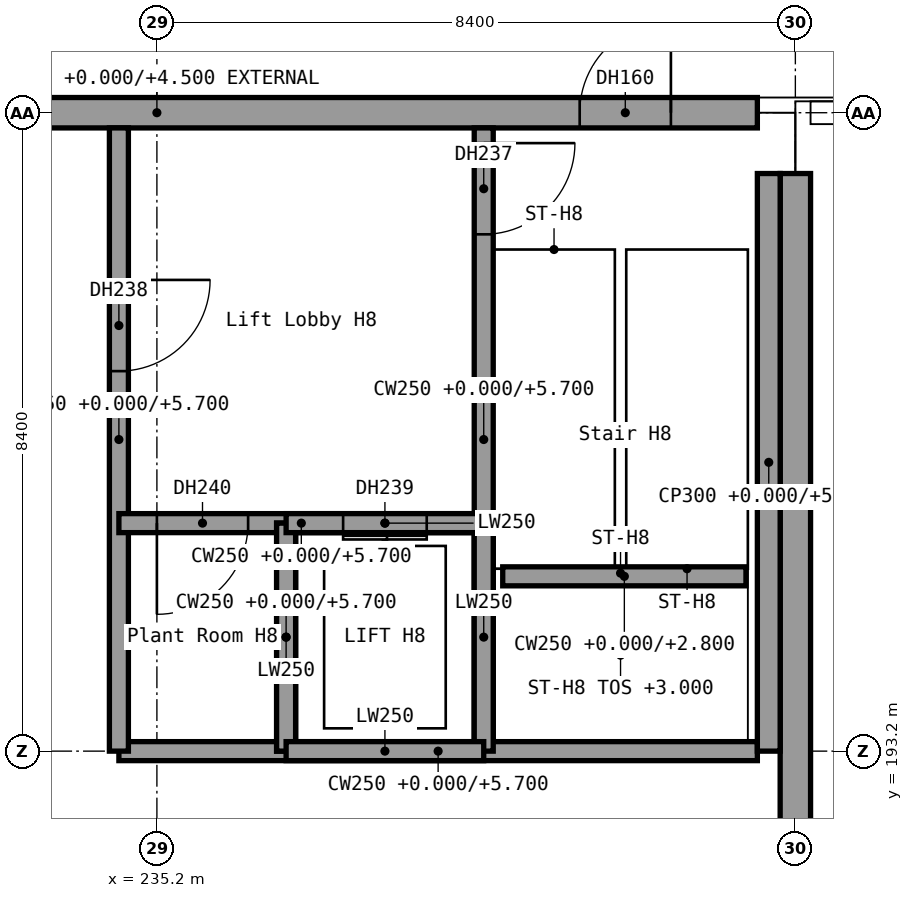
"""IFC4 building model, lengths in metres.
Left out: names, types, materials, properties, quantities, classifications, styles, units other than length and angle.
Written with IfcOpenShell. Run it as: python <this file> out.ifc"""

import sys

from ifc_helpers import new_model, si_unit, direction, frame, frame_2d, origin, origin_2d, place, context, subcontext, project, spatial, rectangle, extrude, element, fill, save


model = new_model("IFC4")
c1 = context("Model", 3, precision=1e-05, world=origin(), true_north=direction((0.0, 1.0)))
c2 = subcontext(c1, "Body", "Model", "MODEL_VIEW")
j1 = project(units=[si_unit("LENGTHUNIT", "METRE"), si_unit("PLANEANGLEUNIT", "RADIAN")], contexts=[c1])
p1 = place(None, origin())
s1 = spatial("IfcSite", under=j1, at=p1, CompositionType="ELEMENT")
p2 = place(p1, origin())
s2 = spatial("IfcBuilding", under=s1, at=p2, CompositionType="ELEMENT")
p3 = place(p2, origin())
s3 = spatial("IfcBuildingStorey", under=s2, at=p3, CompositionType="ELEMENT", Elevation=0.0)
p4 = place(p3, frame((243.6, 201.6, 0.0), z_axis=(0.0, 0.0, 1.0), x_axis=(1.0, 0.0, 0.0)))
e1 = element("IfcColumn", 1, at=p4, inside=s3, PredefinedType="COLUMN", context=c2, shape_type="SweptSolid", body=[
    extrude(rectangle(XDim=1.0, YDim=1.6, at=origin_2d()), origin(), (0.0, 0.0, 1.0), 6.0),
])
p5 = place(p3, frame((227.3, 201.6, 0.0), z_axis=(0.0, 0.0, 1.0), x_axis=(1.0, 0.0, 0.0)))
e2 = element("IfcWall", 2, at=p5, inside=s3, PredefinedType="STANDARD", context=c2, shape_type="SweptSolid", body=[
    extrude(rectangle(XDim=15.8, YDim=0.4, at=frame_2d((7.9, 0.0))), origin(), (0.0, 0.0, 1.0), 4.5),
])
p6 = place(p5, frame((13.462, 0.0, 0.0)))
e3 = element("IfcOpeningElement", 3, at=p6, cuts=e2, PredefinedType="OPENING", context=c2, shape_type="SweptSolid", body=[
    extrude(rectangle(XDim=1.2, YDim=2.1, at=frame_2d((0.6, 1.05))), frame((0.0, 0.2, 0.0), z_axis=(0.0, -1.0, 0.0), x_axis=(1.0, 0.0, 0.0)), (0.0, 0.0, 1.0), 0.4),
])
p7 = place(p5, frame((1.4, 0.0, 0.0)))
e4 = element("IfcOpeningElement", 4, at=p7, cuts=e2, PredefinedType="OPENING", context=c2, shape_type="SweptSolid", body=[
    extrude(rectangle(XDim=3.0, YDim=2.4, at=frame_2d((1.5, 1.2))), frame((0.0, 0.2, 0.0), z_axis=(0.0, -1.0, 0.0), x_axis=(1.0, 0.0, 0.0)), (0.0, 0.0, 1.0), 0.4),
])
p8 = place(p3, frame((243.6, 101.6, 0.0), z_axis=(0.0, 0.0, 1.0), x_axis=(0.0, 1.0, 0.0)))
e5 = element("IfcWall", 5, at=p8, inside=s3, PredefinedType="SHEAR", context=c2, shape_type="SweptSolid", body=[
    extrude(rectangle(XDim=99.2, YDim=0.4, at=frame_2d((49.6, 0.0))), origin(), (0.0, 0.0, 1.0), 6.0),
])
p9 = place(p8, frame((10.9, 0.0, 0.0)))
e6 = element("IfcOpeningElement", 6, at=p9, cuts=e5, PredefinedType="OPENING", context=c2, shape_type="SweptSolid", body=[
    extrude(rectangle(XDim=1.8, YDim=2.4, at=frame_2d((0.9, 1.2))), frame((0.0, 0.2, 0.0), z_axis=(0.0, -1.0, 0.0), x_axis=(1.0, 0.0, 0.0)), (0.0, 0.0, 1.0), 0.4),
])
p10 = place(p8, frame((27.7, 0.0, 0.0)))
e7 = element("IfcOpeningElement", 7, at=p10, cuts=e5, PredefinedType="OPENING", context=c2, shape_type="SweptSolid", body=[
    extrude(rectangle(XDim=1.8, YDim=2.4, at=frame_2d((0.9, 1.2))), frame((0.0, 0.2, 0.0), z_axis=(0.0, -1.0, 0.0), x_axis=(1.0, 0.0, 0.0)), (0.0, 0.0, 1.0), 0.4),
])
p11 = place(p8, frame((44.5, 0.0, 0.0)))
e8 = element("IfcOpeningElement", 8, at=p11, cuts=e5, PredefinedType="OPENING", context=c2, shape_type="SweptSolid", body=[
    extrude(rectangle(XDim=1.8, YDim=2.4, at=frame_2d((0.9, 1.2))), frame((0.0, 0.2, 0.0), z_axis=(0.0, -1.0, 0.0), x_axis=(1.0, 0.0, 0.0)), (0.0, 0.0, 1.0), 0.4),
])
p12 = place(p8, frame((61.3, 0.0, 0.0)))
e9 = element("IfcOpeningElement", 9, at=p12, cuts=e5, PredefinedType="OPENING", context=c2, shape_type="SweptSolid", body=[
    extrude(rectangle(XDim=1.8, YDim=2.4, at=frame_2d((0.9, 1.2))), frame((0.0, 0.2, 0.0), z_axis=(0.0, -1.0, 0.0), x_axis=(1.0, 0.0, 0.0)), (0.0, 0.0, 1.0), 0.4),
])
p13 = place(p8, frame((78.1, 0.0, 0.0)))
e10 = element("IfcOpeningElement", 10, at=p13, cuts=e5, PredefinedType="OPENING", context=c2, shape_type="SweptSolid", body=[
    extrude(rectangle(XDim=1.8, YDim=2.4, at=frame_2d((0.9, 1.2))), frame((0.0, 0.2, 0.0), z_axis=(0.0, -1.0, 0.0), x_axis=(1.0, 0.0, 0.0)), (0.0, 0.0, 1.0), 0.4),
])
p14 = place(p3, frame((243.8, 201.6, 6.0), z_axis=(0.0, 0.0, 1.0), x_axis=(1.0, 0.0, 0.0)))
e11 = element("IfcWall", 11, at=p14, inside=s3, PredefinedType="PARAPET", context=c2, shape_type="SweptSolid", body=[
    extrude(rectangle(XDim=16.45, YDim=0.3, at=frame_2d((8.225, 0.0))), origin(), (0.0, 0.0, 1.0), 1.2),
])
p15 = place(p3, frame((239.5, 201.4, 0.0), z_axis=(0.0, 0.0, 1.0), x_axis=(0.0, -1.0, 0.0)))
e12 = element("IfcWall", 12, at=p15, inside=s3, PredefinedType="SHEAR", context=c2, shape_type="SweptSolid", body=[
    extrude(rectangle(XDim=8.2, YDim=0.25, at=frame_2d((4.1, 0.0))), origin(), (0.0, 0.0, 1.0), 5.7),
])
p16 = place(p15, frame((0.2, 0.0, 0.0)))
e13 = element("IfcOpeningElement", 13, at=p16, cuts=e12, PredefinedType="OPENING", context=c2, shape_type="SweptSolid", body=[
    extrude(rectangle(XDim=1.2, YDim=2.1, at=frame_2d((0.6, 1.05))), frame((0.0, 0.125, 0.0), z_axis=(0.0, -1.0, 0.0), x_axis=(1.0, 0.0, 0.0)), (0.0, 0.0, 1.0), 0.25),
])
p17 = place(p3, frame((243.1, 193.2, 0.0), z_axis=(0.0, 0.0, 1.0), x_axis=(-1.0, 0.0, 0.0)))
e14 = element("IfcWall", 14, at=p17, inside=s3, PredefinedType="SHEAR", context=c2, shape_type="SweptSolid", body=[
    extrude(rectangle(XDim=8.4, YDim=0.25, at=frame_2d((4.2, 0.0))), origin(), (0.0, 0.0, 1.0), 5.7),
])
p18 = place(p3, frame((234.7, 201.4, 0.0), z_axis=(0.0, 0.0, 1.0), x_axis=(0.0, -1.0, 0.0)))
e15 = element("IfcWall", 15, at=p18, inside=s3, PredefinedType="SHEAR", context=c2, shape_type="SweptSolid", body=[
    extrude(rectangle(XDim=8.2, YDim=0.25, at=frame_2d((4.1, 0.0))), origin(), (0.0, 0.0, 1.0), 5.7),
])
p19 = place(p18, frame((2.0, 0.0, 0.0)))
e16 = element("IfcOpeningElement", 16, at=p19, cuts=e15, PredefinedType="OPENING", context=c2, shape_type="SweptSolid", body=[
    extrude(rectangle(XDim=1.2, YDim=2.1, at=frame_2d((0.6, 1.05))), frame((0.0, 0.125, 0.0), z_axis=(0.0, -1.0, 0.0), x_axis=(1.0, 0.0, 0.0)), (0.0, 0.0, 1.0), 0.25),
])
p20 = place(p3, frame((239.5, 196.2, 0.0), z_axis=(0.0, 0.0, 1.0), x_axis=(-1.0, 0.0, 0.0)))
e17 = element("IfcWall", 17, at=p20, inside=s3, PredefinedType="SHEAR", context=c2, shape_type="SweptSolid", body=[
    extrude(rectangle(XDim=4.8, YDim=0.25, at=frame_2d((2.4, 0.0))), origin(), (0.0, 0.0, 1.0), 5.7),
])
p21 = place(p20, frame((0.75, 0.0, 0.0)))
e18 = element("IfcOpeningElement", 18, at=p21, cuts=e17, PredefinedType="OPENING", context=c2, shape_type="SweptSolid", body=[
    extrude(rectangle(XDim=1.1, YDim=2.1, at=frame_2d((0.55, 1.05))), frame((0.0, 0.125, 0.0), z_axis=(0.0, -1.0, 0.0), x_axis=(1.0, 0.0, 0.0)), (0.0, 0.0, 1.0), 0.25),
])
p22 = place(p20, frame((3.1, 0.0, 0.0)))
e19 = element("IfcOpeningElement", 19, at=p22, cuts=e17, PredefinedType="OPENING", context=c2, shape_type="SweptSolid", body=[
    extrude(rectangle(XDim=1.2, YDim=2.1, at=frame_2d((0.6, 1.05))), frame((0.0, 0.125, 0.0), z_axis=(0.0, -1.0, 0.0), x_axis=(1.0, 0.0, 0.0)), (0.0, 0.0, 1.0), 0.25),
])
p23 = place(p3, frame((236.9, 196.2, 0.0), z_axis=(0.0, 0.0, 1.0), x_axis=(0.0, -1.0, 0.0)))
e20 = element("IfcWall", 20, at=p23, inside=s3, PredefinedType="SHEAR", context=c2, shape_type="SweptSolid", body=[
    extrude(rectangle(XDim=3.0, YDim=0.25, at=frame_2d((1.5, 0.0))), origin(), (0.0, 0.0, 1.0), 5.7),
])
p24 = place(p3, frame((243.25, 200.8, 0.0), z_axis=(0.0, 0.0, 1.0), x_axis=(0.0, -1.0, 0.0)))
e21 = element("IfcWall", 21, at=p24, inside=s3, PredefinedType="SHEAR", context=c2, shape_type="SweptSolid", body=[
    extrude(rectangle(XDim=7.6, YDim=0.3, at=frame_2d((3.8, 0.0))), origin(), (0.0, 0.0, 1.0), 5.7),
])
p25 = place(p3, frame((242.95, 195.5, 0.0), z_axis=(0.0, 0.0, 1.0), x_axis=(-1.0, 0.0, 0.0)))
e22 = element("IfcWall", 22, at=p25, inside=s3, PredefinedType="SHEAR", context=c2, shape_type="SweptSolid", body=[
    extrude(rectangle(XDim=3.2, YDim=0.25, at=frame_2d((1.6, 0.0))), origin(), (0.0, 0.0, 1.0), 2.8),
])
for number, where, z_axis, x_axis in (
    (23, (239.5, 196.2, -1.4), (0.0, 0.0, 1.0), (0.0, -1.0, 0.0)),
    (24, (236.9, 196.2, -1.4), (0.0, 0.0, 1.0), (0.0, -1.0, 0.0)),
):
    element("IfcWall", number, at=place(p3, frame(where, z_axis=z_axis, x_axis=x_axis)), inside=s3, PredefinedType="SHEAR", context=c2, shape_type="SweptSolid", body=[
        extrude(rectangle(XDim=3.0, YDim=0.25, at=frame_2d((1.5, 0.0))), origin(), (0.0, 0.0, 1.0), 1.4),
    ])
for number, where, z_axis, x_axis in (
    (25, (239.5, 196.2, -1.4), (0.0, 0.0, 1.0), (-1.0, 0.0, 0.0)),
    (26, (239.5, 193.2, -1.4), (0.0, 0.0, 1.0), (-1.0, 0.0, 0.0)),
):
    element("IfcWall", number, at=place(p3, frame(where, z_axis=z_axis, x_axis=x_axis)), inside=s3, PredefinedType="SHEAR", context=c2, shape_type="SweptSolid", body=[
        extrude(rectangle(XDim=2.6, YDim=0.25, at=frame_2d((1.3, 0.0))), origin(), (0.0, 0.0, 1.0), 1.4),
    ])
p26 = place(p6, origin())
e27 = element("IfcDoor", 27, at=p26, inside=s3, OperationType="SINGLE_SWING_RIGHT", PredefinedType="DOOR", context=c2, shape_type="SweptSolid", body=[
    extrude(rectangle(XDim=1.2, YDim=2.1, at=frame_2d((0.6, 1.05))), frame((0.0, 0.025, 0.0), z_axis=(0.0, -1.0, 0.0), x_axis=(1.0, 0.0, 0.0)), (0.0, 0.0, 1.0), 0.05),
])
fill(e3, e27)
p27 = place(p16, origin())
e28 = element("IfcDoor", 28, at=p27, inside=s3, OperationType="SINGLE_SWING_LEFT", PredefinedType="DOOR", context=c2, shape_type="SweptSolid", body=[
    extrude(rectangle(XDim=1.2, YDim=2.1, at=frame_2d((0.6, 1.05))), frame((0.0, 0.025, 0.0), z_axis=(0.0, -1.0, 0.0), x_axis=(1.0, 0.0, 0.0)), (0.0, 0.0, 1.0), 0.05),
])
fill(e13, e28)
p28 = place(p19, origin())
e29 = element("IfcDoor", 29, at=p28, inside=s3, OperationType="SINGLE_SWING_LEFT", PredefinedType="DOOR", context=c2, shape_type="SweptSolid", body=[
    extrude(rectangle(XDim=1.2, YDim=2.1, at=frame_2d((0.6, 1.05))), frame((0.0, 0.025, 0.0), z_axis=(0.0, -1.0, 0.0), x_axis=(1.0, 0.0, 0.0)), (0.0, 0.0, 1.0), 0.05),
])
fill(e16, e29)
p29 = place(p21, origin())
e30 = element("IfcDoor", 30, at=p29, inside=s3, OperationType="DOUBLE_DOOR_SLIDING", PredefinedType="DOOR", context=c2, shape_type="SweptSolid", body=[
    extrude(rectangle(XDim=1.1, YDim=2.1, at=frame_2d((0.55, 1.05))), frame((0.0, 0.025, 0.0), z_axis=(0.0, -1.0, 0.0), x_axis=(1.0, 0.0, 0.0)), (0.0, 0.0, 1.0), 0.05),
])
fill(e18, e30)
p30 = place(p22, origin())
e31 = element("IfcDoor", 31, at=p30, inside=s3, OperationType="SINGLE_SWING_RIGHT", PredefinedType="DOOR", context=c2, shape_type="SweptSolid", body=[
    extrude(rectangle(XDim=1.2, YDim=2.1, at=frame_2d((0.6, 1.05))), frame((0.0, 0.025, 0.0), z_axis=(0.0, -1.0, 0.0), x_axis=(1.0, 0.0, 0.0)), (0.0, 0.0, 1.0), 0.05),
])
fill(e19, e31)
save(model, sys.argv[1])
